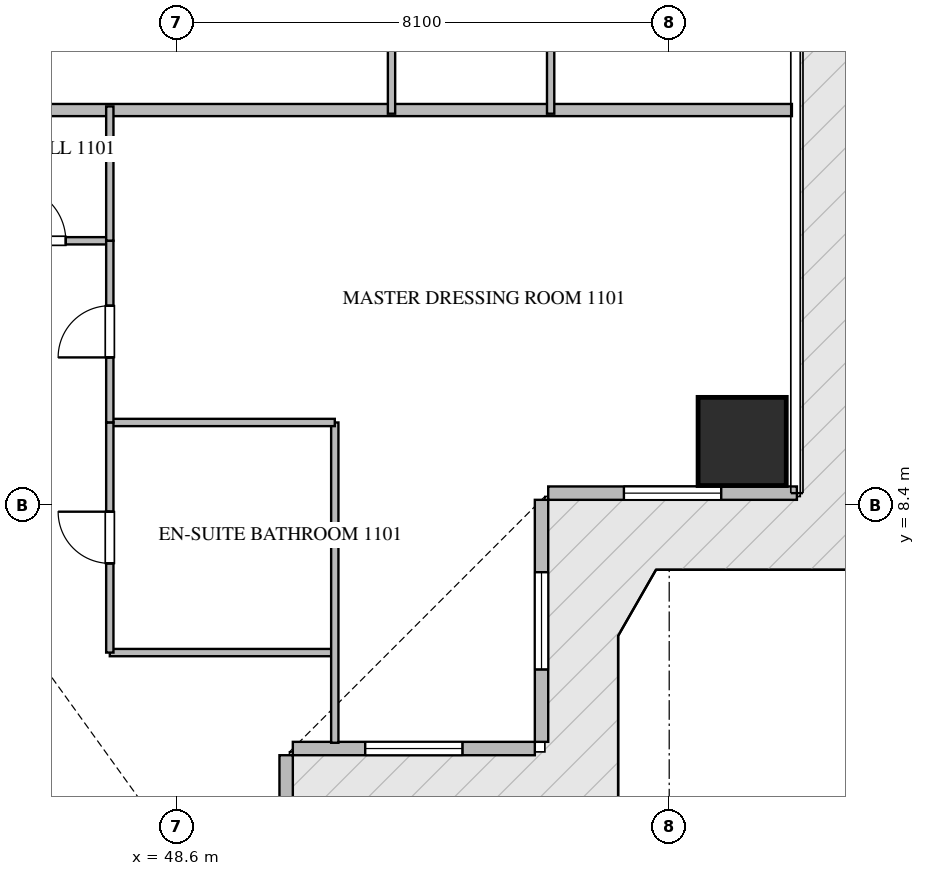
"""IFC4 building model, lengths in metres.
Left out: names, types, materials, properties, quantities, classifications, styles, units other than length and angle.
Written with IfcOpenShell. Run it as: python <this file> out.ifc"""

import sys

from ifc_helpers import new_model, si_unit, direction, frame, frame_2d, origin, origin_2d, place, context, subcontext, project, spatial, rectangle, extrude, source, transform, mapped, element, fill, save


model = new_model("IFC4")
c1 = context("Model", 3, precision=1e-05, world=origin(), true_north=direction((0.0, 1.0)))
c2 = subcontext(c1, "Body", "Model", "MODEL_VIEW")
j1 = project(units=[si_unit("LENGTHUNIT", "METRE"), si_unit("PLANEANGLEUNIT", "RADIAN")], contexts=[c1])
p1 = place(None, origin())
s1 = spatial("IfcSite", under=j1, at=p1, CompositionType="ELEMENT")
p2 = place(p1, origin())
s2 = spatial("IfcBuilding", under=s1, at=p2, CompositionType="ELEMENT")
p3 = place(p2, frame((0.0, 0.0, 49.2)))
s3 = spatial("IfcBuildingStorey", under=s2, at=p3, CompositionType="ELEMENT", Elevation=49.2)
m1 = source(origin(), c2, "Body", "SweptSolid", [
    extrude(rectangle(XDim=1.45, YDim=1.45, at=origin_2d()), origin(), (0.0, 0.0, 1.0), 3.75),
])
p4 = place(p3, frame((57.9, 9.45, -0.26), z_axis=(0.0, 0.0, 1.0), x_axis=(1.0, 0.0, 0.0)))
e1 = element("IfcColumn", 1, at=p4, inside=s3, PredefinedType="COLUMN", context=c2, shape_type="MappedRepresentation", body=[
    mapped(m1, transform((0.0, 0.0, 0.0), scale=1.0)),
])
p5 = place(p3, frame((50.4, 0.2, 0.0), z_axis=(0.0, 0.0, 1.0), x_axis=(0.0, 1.0, 0.0)))
e2 = element("IfcWall", 2, at=p5, inside=s3, PredefinedType="ELEMENTEDWALL", context=c2, shape_type="SweptSolid", body=[
    extrude(rectangle(XDim=4.09, YDim=0.22, at=frame_2d((2.045, 0.0))), origin(), (0.0, 0.0, 1.0), 3.475),
])
p6 = place(p5, frame((1.245, 0.0, 0.65)))
e3 = element("IfcOpeningElement", 3, at=p6, cuts=e2, PredefinedType="OPENING", context=c2, shape_type="SweptSolid", body=[
    extrude(rectangle(XDim=1.6, YDim=2.1, at=frame_2d((0.8, 1.05))), frame((0.0, 0.12, 0.0), z_axis=(0.0, -1.0, 0.0), x_axis=(1.0, 0.0, 0.0)), (0.0, 0.0, 1.0), 0.24),
])
p7 = place(p3, frame((50.51, 4.4, 0.0), z_axis=(0.0, 0.0, 1.0), x_axis=(1.0, 0.0, 0.0)))
e4 = element("IfcWall", 4, at=p7, inside=s3, PredefinedType="ELEMENTEDWALL", context=c2, shape_type="SweptSolid", body=[
    extrude(rectangle(XDim=3.98, YDim=0.22, at=frame_2d((1.99, 0.0))), origin(), (0.0, 0.0, 1.0), 3.475),
])
p8 = place(p7, frame((1.19, 0.0, 0.65)))
e5 = element("IfcOpeningElement", 5, at=p8, cuts=e4, PredefinedType="OPENING", context=c2, shape_type="SweptSolid", body=[
    extrude(rectangle(XDim=1.6, YDim=2.1, at=frame_2d((0.8, 1.05))), frame((0.0, 0.12, 0.0), z_axis=(0.0, -1.0, 0.0), x_axis=(1.0, 0.0, 0.0)), (0.0, 0.0, 1.0), 0.24),
])
p9 = place(p3, frame((54.6, 4.51, 0.0), z_axis=(0.0, 0.0, 1.0), x_axis=(0.0, 1.0, 0.0)))
e6 = element("IfcWall", 6, at=p9, inside=s3, PredefinedType="ELEMENTEDWALL", context=c2, shape_type="SweptSolid", body=[
    extrude(rectangle(XDim=3.98, YDim=0.22, at=frame_2d((1.99, 0.0))), origin(), (0.0, 0.0, 1.0), 3.475),
])
p10 = place(p9, frame((1.19, 0.0, 0.65)))
e7 = element("IfcOpeningElement", 7, at=p10, cuts=e6, PredefinedType="OPENING", context=c2, shape_type="SweptSolid", body=[
    extrude(rectangle(XDim=1.6, YDim=2.1, at=frame_2d((0.8, 1.05))), frame((0.0, 0.12, 0.0), z_axis=(0.0, -1.0, 0.0), x_axis=(1.0, 0.0, 0.0)), (0.0, 0.0, 1.0), 0.24),
])
p11 = place(p3, frame((54.71, 8.6, 0.0), z_axis=(0.0, 0.0, 1.0), x_axis=(1.0, 0.0, 0.0)))
e8 = element("IfcWall", 8, at=p11, inside=s3, PredefinedType="ELEMENTEDWALL", context=c2, shape_type="SweptSolid", body=[
    extrude(rectangle(XDim=4.09, YDim=0.22, at=frame_2d((2.045, 0.0))), origin(), (0.0, 0.0, 1.0), 3.475),
])
p12 = place(p11, frame((1.245, 0.0, 0.65)))
e9 = element("IfcOpeningElement", 9, at=p12, cuts=e8, PredefinedType="OPENING", context=c2, shape_type="SweptSolid", body=[
    extrude(rectangle(XDim=1.6, YDim=2.1, at=frame_2d((0.8, 1.05))), frame((0.0, 0.12, 0.0), z_axis=(0.0, -1.0, 0.0), x_axis=(1.0, 0.0, 0.0)), (0.0, 0.0, 1.0), 0.24),
])
p13 = place(p3, frame((43.4, 14.9, 0.0), z_axis=(0.0, 0.0, 1.0), x_axis=(1.0, 0.0, 0.0)))
e10 = element("IfcWall", 10, at=p13, inside=s3, PredefinedType="PARTITIONING", context=c2, shape_type="SweptSolid", body=[
    extrude(rectangle(XDim=15.318, YDim=0.2, at=frame_2d((7.659, 0.0))), origin(), (0.0, 0.0, 1.0), 3.49),
])
p14 = place(p3, frame((45.152, 12.75, 0.0), z_axis=(0.0, 0.0, 1.0), x_axis=(1.0, 0.0, 0.0)))
e11 = element("IfcWall", 11, at=p14, inside=s3, PredefinedType="PARTITIONING", context=c2, shape_type="SweptSolid", body=[
    extrude(rectangle(XDim=2.348, YDim=0.12, at=frame_2d((1.174, 0.0))), origin(), (0.0, 0.0, 1.0), 3.49),
])
p15 = place(p14, frame((0.724, 0.0, 0.0)))
e12 = element("IfcOpeningElement", 12, at=p15, cuts=e11, PredefinedType="OPENING", context=c2, shape_type="SweptSolid", body=[
    extrude(rectangle(XDim=0.9, YDim=2.1, at=frame_2d((0.45, 1.05))), frame((0.0, 0.07, 0.0), z_axis=(0.0, -1.0, 0.0), x_axis=(1.0, 0.0, 0.0)), (0.0, 0.0, 1.0), 0.14),
])
p16 = place(p3, frame((47.5, 5.978, 0.0), z_axis=(0.0, 0.0, 1.0), x_axis=(1.0, 0.0, 0.0)))
e13 = element("IfcWall", 13, at=p16, inside=s3, PredefinedType="PARTITIONING", context=c2, shape_type="SweptSolid", body=[
    extrude(rectangle(XDim=3.7, YDim=0.12, at=frame_2d((1.85, 0.0))), origin(), (0.0, 0.0, 1.0), 3.49),
])
p17 = place(p3, frame((51.2, 4.495, 0.0), z_axis=(0.0, 0.0, 1.0), x_axis=(0.0, 1.0, 0.0)))
e14 = element("IfcWall", 14, at=p17, inside=s3, PredefinedType="PARTITIONING", context=c2, shape_type="SweptSolid", body=[
    extrude(rectangle(XDim=5.267, YDim=0.12, at=frame_2d((2.633, 0.0))), origin(), (0.0, 0.0, 1.0), 3.49),
])
p18 = place(p3, frame((47.5, 9.762, 0.0), z_axis=(0.0, 0.0, 1.0), x_axis=(1.0, 0.0, 0.0)))
e15 = element("IfcWall", 15, at=p18, inside=s3, PredefinedType="PARTITIONING", context=c2, shape_type="SweptSolid", body=[
    extrude(rectangle(XDim=3.7, YDim=0.12, at=frame_2d((1.85, 0.0))), origin(), (0.0, 0.0, 1.0), 3.49),
])
p19 = place(p3, frame((47.5, 5.978, 0.0), z_axis=(0.0, 0.0, 1.0), x_axis=(0.0, 1.0, 0.0)))
e16 = element("IfcWall", 16, at=p19, inside=s3, PredefinedType="PARTITIONING", context=c2, shape_type="SweptSolid", body=[
    extrude(rectangle(XDim=3.784, YDim=0.12, at=frame_2d((1.892, 0.0))), origin(), (0.0, 0.0, 1.0), 3.49),
])
p20 = place(p19, frame((1.467, 0.0, 0.0)))
e17 = element("IfcOpeningElement", 17, at=p20, cuts=e16, PredefinedType="OPENING", context=c2, shape_type="SweptSolid", body=[
    extrude(rectangle(XDim=0.85, YDim=2.1, at=frame_2d((0.425, 1.05))), frame((0.0, 0.07, 0.0), z_axis=(0.0, -1.0, 0.0), x_axis=(1.0, 0.0, 0.0)), (0.0, 0.0, 1.0), 0.14),
])
p21 = place(p3, frame((47.5, 9.764, 0.0), z_axis=(0.0, 0.0, 1.0), x_axis=(0.0, 1.0, 0.0)))
e18 = element("IfcWall", 18, at=p21, inside=s3, PredefinedType="PARTITIONING", context=c2, shape_type="SweptSolid", body=[
    extrude(rectangle(XDim=2.986, YDim=0.12, at=frame_2d((1.493, 0.0))), origin(), (0.0, 0.0, 1.0), 3.49),
])
p22 = place(p21, frame((1.068, 0.0, 0.0)))
e19 = element("IfcOpeningElement", 19, at=p22, cuts=e18, PredefinedType="OPENING", context=c2, shape_type="SweptSolid", body=[
    extrude(rectangle(XDim=0.85, YDim=2.1, at=frame_2d((0.425, 1.05))), frame((0.0, 0.07, 0.0), z_axis=(0.0, -1.0, 0.0), x_axis=(1.0, 0.0, 0.0)), (0.0, 0.0, 1.0), 0.14),
])
p23 = place(p3, frame((47.5, 12.752, 0.0), z_axis=(0.0, 0.0, 1.0), x_axis=(0.0, 1.0, 0.0)))
e20 = element("IfcWall", 20, at=p23, inside=s3, PredefinedType="PARTITIONING", context=c2, shape_type="SweptSolid", body=[
    extrude(rectangle(XDim=2.208, YDim=0.12, at=frame_2d((1.104, 0.0))), origin(), (0.0, 0.0, 1.0), 3.49),
])
for number, where, z_axis, x_axis in (
    (21, (54.75, 14.84, 0.0), (0.0, 0.0, 1.0), (0.0, 1.0, 0.0)),
    (22, (52.133, 14.84, 0.0), (0.0, 0.0, 1.0), (0.0, 1.0, 0.0)),
):
    element("IfcWall", number, at=place(p3, frame(where, z_axis=z_axis, x_axis=x_axis)), inside=s3, PredefinedType="PARTITIONING", context=c2, shape_type="SweptSolid", body=[
        extrude(rectangle(XDim=5.41, YDim=0.12, at=frame_2d((2.705, 0.0))), origin(), (0.0, 0.0, 1.0), 3.49),
    ])
m2 = source(origin(), c2, "Body", "SweptSolid", [
    extrude(rectangle(XDim=1.6, YDim=2.1, at=frame_2d((0.8, 1.05))), frame((0.0, 0.03, 0.0), z_axis=(0.0, -1.0, 0.0), x_axis=(1.0, 0.0, 0.0)), (0.0, 0.0, 1.0), 0.06),
])
p24 = place(p8, origin())
e23 = element("IfcWindow", 23, at=p24, inside=s3, PartitioningType="SINGLE_PANEL", PredefinedType="WINDOW", context=c2, shape_type="MappedRepresentation", body=[
    mapped(m2, transform((0.0, 0.0, 0.0), scale=1.0)),
])
fill(e5, e23)
p25 = place(p10, origin())
e24 = element("IfcWindow", 24, at=p25, inside=s3, PartitioningType="SINGLE_PANEL", PredefinedType="WINDOW", context=c2, shape_type="MappedRepresentation", body=[
    mapped(m2, transform((0.0, 0.0, 0.0), scale=1.0)),
])
fill(e7, e24)
p26 = place(p12, origin())
e25 = element("IfcWindow", 25, at=p26, inside=s3, PartitioningType="SINGLE_PANEL", PredefinedType="WINDOW", context=c2, shape_type="MappedRepresentation", body=[
    mapped(m2, transform((0.0, 0.0, 0.0), scale=1.0)),
])
fill(e9, e25)
m3 = source(origin(), c2, "Body", "SweptSolid", [
    extrude(rectangle(XDim=0.9, YDim=2.1, at=frame_2d((0.45, 1.05))), frame((0.0, 0.025, 0.0), z_axis=(0.0, -1.0, 0.0), x_axis=(1.0, 0.0, 0.0)), (0.0, 0.0, 1.0), 0.05),
])
p27 = place(p15, origin())
e26 = element("IfcDoor", 26, at=p27, inside=s3, OperationType="SINGLE_SWING_LEFT", PredefinedType="DOOR", context=c2, shape_type="MappedRepresentation", body=[
    mapped(m3, transform((0.0, 0.0, 0.0), scale=1.0)),
])
fill(e12, e26)
m4 = source(origin(), c2, "Body", "SweptSolid", [
    extrude(rectangle(XDim=0.85, YDim=2.1, at=frame_2d((0.425, 1.05))), frame((0.0, 0.025, 0.0), z_axis=(0.0, -1.0, 0.0), x_axis=(1.0, 0.0, 0.0)), (0.0, 0.0, 1.0), 0.05),
])
p28 = place(p20, origin())
e27 = element("IfcDoor", 27, at=p28, inside=s3, OperationType="SINGLE_SWING_RIGHT", PredefinedType="DOOR", context=c2, shape_type="MappedRepresentation", body=[
    mapped(m4, transform((0.0, 0.0, 0.0), scale=1.0)),
])
fill(e17, e27)
p29 = place(p22, origin())
e28 = element("IfcDoor", 28, at=p29, inside=s3, OperationType="SINGLE_SWING_LEFT", PredefinedType="DOOR", context=c2, shape_type="MappedRepresentation", body=[
    mapped(m4, transform((0.0, 0.0, 0.0), scale=1.0)),
])
fill(e19, e28)
save(model, sys.argv[1])
